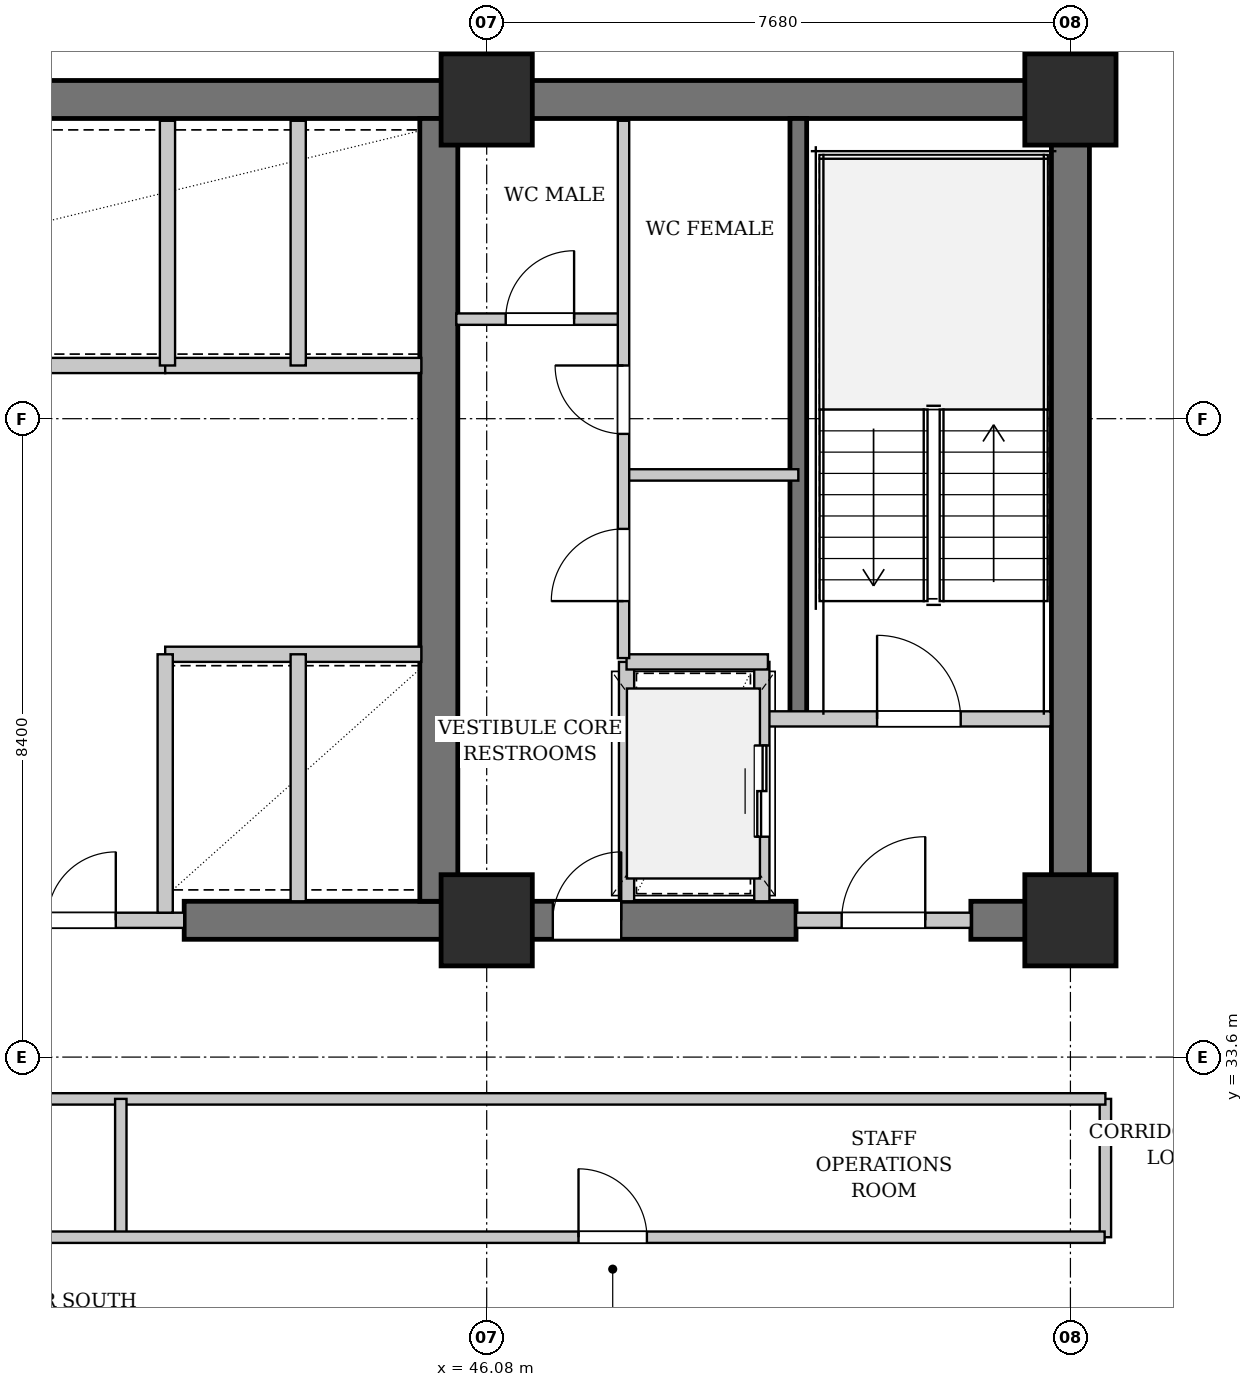
"""IFC4 building model, lengths in metres.
Left out: names, types, materials, properties, quantities, classifications, styles, units other than length and angle.
Written with IfcOpenShell. Run it as: python <this file> out.ifc"""

import sys

from ifc_helpers import new_model, si_unit, direction, frame, frame_2d, origin, origin_2d, place, context, subcontext, project, spatial, rectangle, extrude, element, fill, save


model = new_model("IFC4")
c1 = context("Model", 3, precision=1e-05, world=origin(), true_north=direction((0.0, 1.0)))
c2 = subcontext(c1, "Body", "Model", "MODEL_VIEW")
j1 = project(units=[si_unit("LENGTHUNIT", "METRE"), si_unit("PLANEANGLEUNIT", "RADIAN")], contexts=[c1])
p1 = place(None, origin())
s1 = spatial("IfcSite", under=j1, at=p1, CompositionType="ELEMENT")
p2 = place(p1, origin())
s2 = spatial("IfcBuilding", under=s1, at=p2, CompositionType="ELEMENT")
p3 = place(p2, frame((0.0, 0.0, 64.4)))
s3 = spatial("IfcBuildingStorey", under=s2, at=p3, CompositionType="ELEMENT", Elevation=64.4)
p4 = place(p3, frame((22.79, 46.2, 0.0), z_axis=(0.0, 0.0, 1.0), x_axis=(1.0, 0.0, 0.0)))
e1 = element("IfcWall", 1, at=p4, inside=s3, PredefinedType="SHEAR", context=c2, shape_type="SweptSolid", body=[
    extrude(rectangle(XDim=31.22, YDim=0.5, at=frame_2d((15.61, 0.0))), origin(), (0.0, 0.0, 1.0), 3.18),
])
p5 = place(p3, frame((42.1, 35.4, 0.0), z_axis=(0.0, 0.0, 1.0), x_axis=(1.0, 0.0, 0.0)))
e2 = element("IfcWall", 2, at=p5, inside=s3, PredefinedType="SHEAR", context=c2, shape_type="SweptSolid", body=[
    extrude(rectangle(XDim=8.05, YDim=0.5, at=frame_2d((4.025, 0.0))), origin(), (0.0, 0.0, 1.0), 3.18),
])
p6 = place(p5, frame((4.85, 0.0, 0.0)))
e3 = element("IfcOpeningElement", 3, at=p6, cuts=e2, PredefinedType="OPENING", context=c2, shape_type="SweptSolid", body=[
    extrude(rectangle(XDim=0.9, YDim=2.15, at=frame_2d((0.45, 1.075))), frame((0.0, 0.26, 0.0), z_axis=(0.0, -1.0, 0.0), x_axis=(1.0, 0.0, 0.0)), (0.0, 0.0, 1.0), 0.52),
])
p7 = place(p3, frame((52.45, 35.4, 0.0), z_axis=(0.0, 0.0, 1.0), x_axis=(1.0, 0.0, 0.0)))
e4 = element("IfcWall", 4, at=p7, inside=s3, PredefinedType="SHEAR", context=c2, shape_type="SweptSolid", body=[
    extrude(rectangle(XDim=1.56, YDim=0.5, at=frame_2d((0.78, 0.0))), origin(), (0.0, 0.0, 1.0), 3.18),
])
for number, where, z_axis, x_axis in (
    (5, (45.45, 35.65, 0.0), (0.0, 0.0, 1.0), (0.0, 1.0, 0.0)),
    (6, (53.76, 35.65, 0.0), (0.0, 0.0, 1.0), (0.0, 1.0, 0.0)),
):
    element("IfcWall", number, at=place(p3, frame(where, z_axis=z_axis, x_axis=x_axis)), inside=s3, PredefinedType="SHEAR", context=c2, shape_type="SweptSolid", body=[
        extrude(rectangle(XDim=10.3, YDim=0.5, at=frame_2d((5.15, 0.0))), origin(), (0.0, 0.0, 1.0), 3.18),
    ])
p8 = place(p3, frame((50.18, 38.05, 0.0), z_axis=(0.0, 0.0, 1.0), x_axis=(0.0, 1.0, 0.0)))
e7 = element("IfcWall", 7, at=p8, inside=s3, PredefinedType="SHEAR", context=c2, shape_type="SweptSolid", body=[
    extrude(rectangle(XDim=7.9, YDim=0.22, at=frame_2d((3.95, 0.0))), origin(), (0.0, 0.0, 1.0), 3.18),
])
for number, where, z_axis, x_axis in (
    (8, (46.08, 35.4, 0.0), (0.0, 0.0, 1.0), (1.0, 0.0, 0.0)),
    (9, (46.08, 46.2, 0.0), (0.0, 0.0, 1.0), (1.0, 0.0, 0.0)),
    (10, (53.76, 35.4, 0.0), (0.0, 0.0, 1.0), (1.0, 0.0, 0.0)),
    (11, (53.76, 46.2, 0.0), (0.0, 0.0, 1.0), (1.0, 0.0, 0.0)),
):
    element("IfcColumn", number, at=place(p3, frame(where, z_axis=z_axis, x_axis=x_axis)), inside=s3, PredefinedType="COLUMN", context=c2, shape_type="SweptSolid", body=[
        extrude(rectangle(XDim=1.2, YDim=1.2, at=origin_2d()), origin(), (0.0, 0.0, 1.0), 3.4),
    ])
p9 = place(p3, frame((35.6, 35.4, 0.0), z_axis=(0.0, 0.0, 1.0), x_axis=(1.0, 0.0, 0.0)))
e12 = element("IfcWall", 12, at=p9, inside=s3, PredefinedType="PARTITIONING", context=c2, shape_type="SweptSolid", body=[
    extrude(rectangle(XDim=6.5, YDim=0.2, at=frame_2d((3.25, 0.0))), origin(), (0.0, 0.0, 1.0), 2.475),
])
p10 = place(p9, frame((3.8, 0.0, 0.0)))
e13 = element("IfcOpeningElement", 13, at=p10, cuts=e12, PredefinedType="OPENING", context=c2, shape_type="SweptSolid", body=[
    extrude(rectangle(XDim=1.8, YDim=2.3, at=frame_2d((0.9, 1.15))), frame((0.0, 0.11, 0.0), z_axis=(0.0, -1.0, 0.0), x_axis=(1.0, 0.0, 0.0)), (0.0, 0.0, 1.0), 0.22),
])
p11 = place(p3, frame((36.6, 42.7, 0.0), z_axis=(0.0, 0.0, 1.0), x_axis=(1.0, 0.0, 0.0)))
e14 = element("IfcWall", 14, at=p11, inside=s3, PredefinedType="PARTITIONING", context=c2, shape_type="SweptSolid", body=[
    extrude(rectangle(XDim=5.25, YDim=0.2, at=frame_2d((2.625, 0.0))), origin(), (0.0, 0.0, 1.0), 3.18),
])
for number, where, z_axis, x_axis in (
    (15, (41.85, 38.9, 0.0), (0.0, 0.0, 1.0), (1.0, 0.0, 0.0)),
    (16, (41.85, 42.7, 0.0), (0.0, 0.0, 1.0), (1.0, 0.0, 0.0)),
):
    element("IfcWall", number, at=place(p3, frame(where, z_axis=z_axis, x_axis=x_axis)), inside=s3, PredefinedType="PARTITIONING", context=c2, shape_type="SweptSolid", body=[
        extrude(rectangle(XDim=3.37, YDim=0.2, at=frame_2d((1.685, 0.0))), origin(), (0.0, 0.0, 1.0), 3.18),
    ])
p12 = place(p3, frame((43.6, 35.65, 0.0), z_axis=(0.0, 0.0, 1.0), x_axis=(0.0, 1.0, 0.0)))
e17 = element("IfcWall", 17, at=p12, inside=s3, PredefinedType="PARTITIONING", context=c2, shape_type="SweptSolid", body=[
    extrude(rectangle(XDim=3.25, YDim=0.2, at=frame_2d((1.625, 0.0))), origin(), (0.0, 0.0, 1.0), 3.18),
])
p13 = place(p3, frame((43.6, 42.7, 0.0), z_axis=(0.0, 0.0, 1.0), x_axis=(0.0, 1.0, 0.0)))
e18 = element("IfcWall", 18, at=p13, inside=s3, PredefinedType="PARTITIONING", context=c2, shape_type="SweptSolid", body=[
    extrude(rectangle(XDim=3.22, YDim=0.2, at=frame_2d((1.61, 0.0))), origin(), (0.0, 0.0, 1.0), 3.18),
])
p14 = place(p3, frame((41.85, 35.5, 0.0), z_axis=(0.0, 0.0, 1.0), x_axis=(0.0, 1.0, 0.0)))
e19 = element("IfcWall", 19, at=p14, inside=s3, PredefinedType="PARTITIONING", context=c2, shape_type="SweptSolid", body=[
    extrude(rectangle(XDim=3.4, YDim=0.2, at=frame_2d((1.7, 0.0))), origin(), (0.0, 0.0, 1.0), 3.18),
])
p15 = place(p3, frame((41.88, 42.7, 0.0), z_axis=(0.0, 0.0, 1.0), x_axis=(0.0, 1.0, 0.0)))
e20 = element("IfcWall", 20, at=p15, inside=s3, PredefinedType="PARTITIONING", context=c2, shape_type="SweptSolid", body=[
    extrude(rectangle(XDim=3.22, YDim=0.2, at=frame_2d((1.61, 0.0))), origin(), (0.0, 0.0, 1.0), 3.18),
])
p16 = place(p3, frame((49.78, 38.05, 0.0), z_axis=(0.0, 0.0, 1.0), x_axis=(1.0, 0.0, 0.0)))
e21 = element("IfcWall", 21, at=p16, inside=s3, PredefinedType="PARTITIONING", context=c2, shape_type="SweptSolid", body=[
    extrude(rectangle(XDim=3.72, YDim=0.2, at=frame_2d((1.86, 0.0))), origin(), (0.0, 0.0, 1.0), 3.18),
])
p17 = place(p16, frame((1.436, 0.0, 0.0)))
e22 = element("IfcOpeningElement", 22, at=p17, cuts=e21, PredefinedType="OPENING", context=c2, shape_type="SweptSolid", body=[
    extrude(rectangle(XDim=1.1, YDim=2.15, at=frame_2d((0.55, 1.075))), frame((0.0, 0.11, 0.0), z_axis=(0.0, -1.0, 0.0), x_axis=(1.0, 0.0, 0.0)), (0.0, 0.0, 1.0), 0.22),
])
p18 = place(p3, frame((50.15, 35.4, 0.0), z_axis=(0.0, 0.0, 1.0), x_axis=(1.0, 0.0, 0.0)))
e23 = element("IfcWall", 23, at=p18, inside=s3, PredefinedType="PARTITIONING", context=c2, shape_type="SweptSolid", body=[
    extrude(rectangle(XDim=2.3, YDim=0.2, at=frame_2d((1.15, 0.0))), origin(), (0.0, 0.0, 1.0), 2.475),
])
p19 = place(p18, frame((0.6, 0.0, 0.0)))
e24 = element("IfcOpeningElement", 24, at=p19, cuts=e23, PredefinedType="OPENING", context=c2, shape_type="SweptSolid", body=[
    extrude(rectangle(XDim=1.1, YDim=2.15, at=frame_2d((0.55, 1.075))), frame((0.0, 0.11, 0.0), z_axis=(0.0, -1.0, 0.0), x_axis=(1.0, 0.0, 0.0)), (0.0, 0.0, 1.0), 0.22),
])
p20 = place(p3, frame((49.7, 35.65, 0.0), z_axis=(0.0, 0.0, 1.0), x_axis=(0.0, 1.0, 0.0)))
e25 = element("IfcWall", 25, at=p20, inside=s3, PredefinedType="PARTITIONING", context=c2, shape_type="SweptSolid", body=[
    extrude(rectangle(XDim=3.15, YDim=0.2, at=frame_2d((1.575, 0.0))), origin(), (0.0, 0.0, 1.0), 3.18),
])
p21 = place(p20, frame((0.85, 0.0, 0.0)))
e26 = element("IfcOpeningElement", 26, at=p21, cuts=e25, PredefinedType="OPENING", context=c2, shape_type="SweptSolid", body=[
    extrude(rectangle(XDim=1.2, YDim=2.2, at=frame_2d((0.6, 1.1))), frame((0.0, 0.11, 0.0), z_axis=(0.0, -1.0, 0.0), x_axis=(1.0, 0.0, 0.0)), (0.0, 0.0, 1.0), 0.22),
])
p22 = place(p3, frame((47.92, 35.65, 0.0), z_axis=(0.0, 0.0, 1.0), x_axis=(0.0, 1.0, 0.0)))
e27 = element("IfcWall", 27, at=p22, inside=s3, PredefinedType="PARTITIONING", context=c2, shape_type="SweptSolid", body=[
    extrude(rectangle(XDim=3.15, YDim=0.2, at=frame_2d((1.575, 0.0))), origin(), (0.0, 0.0, 1.0), 3.18),
])
p23 = place(p3, frame((47.92, 38.8, 0.0), z_axis=(0.0, 0.0, 1.0), x_axis=(1.0, 0.0, 0.0)))
e28 = element("IfcWall", 28, at=p23, inside=s3, PredefinedType="PARTITIONING", context=c2, shape_type="SweptSolid", body=[
    extrude(rectangle(XDim=1.86, YDim=0.2, at=frame_2d((0.93, 0.0))), origin(), (0.0, 0.0, 1.0), 3.18),
])
p24 = place(p3, frame((45.68, 43.31, 0.0), z_axis=(0.0, 0.0, 1.0), x_axis=(1.0, 0.0, 0.0)))
e29 = element("IfcWall", 29, at=p24, inside=s3, PredefinedType="PARTITIONING", context=c2, shape_type="SweptSolid", body=[
    extrude(rectangle(XDim=2.2, YDim=0.15, at=frame_2d((1.1, 0.0))), origin(), (0.0, 0.0, 1.0), 3.18),
])
p25 = place(p24, frame((0.65, 0.0, 0.0)))
e30 = element("IfcOpeningElement", 30, at=p25, cuts=e29, PredefinedType="OPENING", context=c2, shape_type="SweptSolid", body=[
    extrude(rectangle(XDim=0.9, YDim=2.15, at=frame_2d((0.45, 1.075))), frame((0.0, 0.085, 0.0), z_axis=(0.0, -1.0, 0.0), x_axis=(1.0, 0.0, 0.0)), (0.0, 0.0, 1.0), 0.17),
])
p26 = place(p3, frame((47.88, 41.26, 0.0), z_axis=(0.0, 0.0, 1.0), x_axis=(1.0, 0.0, 0.0)))
e31 = element("IfcWall", 31, at=p26, inside=s3, PredefinedType="PARTITIONING", context=c2, shape_type="SweptSolid", body=[
    extrude(rectangle(XDim=2.3, YDim=0.15, at=frame_2d((1.15, 0.0))), origin(), (0.0, 0.0, 1.0), 3.18),
])
p27 = place(p3, frame((47.88, 38.85, 0.0), z_axis=(0.0, 0.0, 1.0), x_axis=(0.0, 1.0, 0.0)))
e32 = element("IfcWall", 32, at=p27, inside=s3, PredefinedType="PARTITIONING", context=c2, shape_type="SweptSolid", body=[
    extrude(rectangle(XDim=7.07, YDim=0.15, at=frame_2d((3.535, 0.0))), origin(), (0.0, 0.0, 1.0), 3.18),
])
p28 = place(p27, frame((0.75, 0.0, 0.0)))
e33 = element("IfcOpeningElement", 33, at=p28, cuts=e32, PredefinedType="OPENING", context=c2, shape_type="SweptSolid", body=[
    extrude(rectangle(XDim=0.95, YDim=2.15, at=frame_2d((0.475, 1.075))), frame((0.0, 0.085, 0.0), z_axis=(0.0, -1.0, 0.0), x_axis=(1.0, 0.0, 0.0)), (0.0, 0.0, 1.0), 0.17),
])
p29 = place(p27, frame((2.95, 0.0, 0.0)))
e34 = element("IfcOpeningElement", 34, at=p29, cuts=e32, PredefinedType="OPENING", context=c2, shape_type="SweptSolid", body=[
    extrude(rectangle(XDim=0.9, YDim=2.15, at=frame_2d((0.45, 1.075))), frame((0.0, 0.085, 0.0), z_axis=(0.0, -1.0, 0.0), x_axis=(1.0, 0.0, 0.0)), (0.0, 0.0, 1.0), 0.17),
])
p30 = place(p3, frame((54.22, 31.23, 0.0), z_axis=(0.0, 0.0, 1.0), x_axis=(0.0, 1.0, 0.0)))
e35 = element("IfcWall", 35, at=p30, inside=s3, PredefinedType="PARTITIONING", context=c2, shape_type="SweptSolid", body=[
    extrude(rectangle(XDim=1.82, YDim=0.15, at=frame_2d((0.91, 0.0))), origin(), (0.0, 0.0, 1.0), 3.18),
])
p31 = place(p3, frame((22.63, 33.05, 0.0), z_axis=(0.0, 0.0, 1.0), x_axis=(1.0, 0.0, 0.0)))
e36 = element("IfcWall", 36, at=p31, inside=s3, PredefinedType="PARTITIONING", context=c2, shape_type="SweptSolid", body=[
    extrude(rectangle(XDim=31.59, YDim=0.15, at=frame_2d((15.795, 0.0))), origin(), (0.0, 0.0, 1.0), 3.18),
])
p32 = place(p3, frame((41.266, 31.23, 0.0), z_axis=(0.0, 0.0, 1.0), x_axis=(0.0, 1.0, 0.0)))
e37 = element("IfcWall", 37, at=p32, inside=s3, PredefinedType="PARTITIONING", context=c2, shape_type="SweptSolid", body=[
    extrude(rectangle(XDim=1.82, YDim=0.15, at=frame_2d((0.91, 0.0))), origin(), (0.0, 0.0, 1.0), 3.18),
])
p33 = place(p3, frame((22.64, 31.23, 0.0), z_axis=(0.0, 0.0, 1.0), x_axis=(1.0, 0.0, 0.0)))
e38 = element("IfcWall", 38, at=p33, inside=s3, PredefinedType="PARTITIONING", context=c2, shape_type="SweptSolid", body=[
    extrude(rectangle(XDim=31.57, YDim=0.15, at=frame_2d((15.785, 0.0))), origin(), (0.0, 0.0, 1.0), 3.18),
])
p34 = place(p33, frame((3.18, 0.0, 0.0)))
e39 = element("IfcOpeningElement", 39, at=p34, cuts=e38, PredefinedType="OPENING", context=c2, shape_type="SweptSolid", body=[
    extrude(rectangle(XDim=0.9, YDim=2.15, at=frame_2d((0.45, 1.075))), frame((0.0, 0.085, 0.0), z_axis=(0.0, -1.0, 0.0), x_axis=(1.0, 0.0, 0.0)), (0.0, 0.0, 1.0), 0.17),
])
p35 = place(p33, frame((12.493, 0.0, 0.0)))
e40 = element("IfcOpeningElement", 40, at=p35, cuts=e38, PredefinedType="OPENING", context=c2, shape_type="SweptSolid", body=[
    extrude(rectangle(XDim=0.9, YDim=2.15, at=frame_2d((0.45, 1.075))), frame((0.0, 0.085, 0.0), z_axis=(0.0, -1.0, 0.0), x_axis=(1.0, 0.0, 0.0)), (0.0, 0.0, 1.0), 0.17),
])
p36 = place(p33, frame((24.648, 0.0, 0.0)))
e41 = element("IfcOpeningElement", 41, at=p36, cuts=e38, PredefinedType="OPENING", context=c2, shape_type="SweptSolid", body=[
    extrude(rectangle(XDim=0.9, YDim=2.15, at=frame_2d((0.45, 1.075))), frame((0.0, 0.085, 0.0), z_axis=(0.0, -1.0, 0.0), x_axis=(1.0, 0.0, 0.0)), (0.0, 0.0, 1.0), 0.17),
])
p37 = place(p10, origin())
e42 = element("IfcDoor", 42, at=p37, inside=s3, OperationType="DOUBLE_DOOR_SINGLE_SWING", PredefinedType="DOOR", context=c2, shape_type="SweptSolid", body=[
    extrude(rectangle(XDim=1.8, YDim=2.3, at=frame_2d((0.9, 1.15))), frame((0.0, 0.025, 0.0), z_axis=(0.0, -1.0, 0.0), x_axis=(1.0, 0.0, 0.0)), (0.0, 0.0, 1.0), 0.05),
])
fill(e13, e42)
p38 = place(p17, origin())
e43 = element("IfcDoor", 43, at=p38, inside=s3, OperationType="SINGLE_SWING_LEFT", PredefinedType="DOOR", context=c2, shape_type="SweptSolid", body=[
    extrude(rectangle(XDim=1.1, YDim=2.15, at=frame_2d((0.55, 1.075))), frame((0.0, 0.025, 0.0), z_axis=(0.0, -1.0, 0.0), x_axis=(1.0, 0.0, 0.0)), (0.0, 0.0, 1.0), 0.05),
])
fill(e22, e43)
p39 = place(p19, origin())
e44 = element("IfcDoor", 44, at=p39, inside=s3, OperationType="SINGLE_SWING_RIGHT", PredefinedType="DOOR", context=c2, shape_type="SweptSolid", body=[
    extrude(rectangle(XDim=1.1, YDim=2.15, at=frame_2d((0.55, 1.075))), frame((0.0, 0.025, 0.0), z_axis=(0.0, -1.0, 0.0), x_axis=(1.0, 0.0, 0.0)), (0.0, 0.0, 1.0), 0.05),
])
fill(e24, e44)
p40 = place(p21, origin())
e45 = element("IfcDoor", 45, at=p40, inside=s3, OperationType="DOUBLE_DOOR_SLIDING", PredefinedType="DOOR", context=c2, shape_type="SweptSolid", body=[
    extrude(rectangle(XDim=1.2, YDim=2.2, at=frame_2d((0.6, 1.1))), frame((0.0, 0.025, 0.0), z_axis=(0.0, -1.0, 0.0), x_axis=(1.0, 0.0, 0.0)), (0.0, 0.0, 1.0), 0.05),
])
fill(e26, e45)
p41 = place(p25, origin())
e46 = element("IfcDoor", 46, at=p41, inside=s3, OperationType="SINGLE_SWING_RIGHT", PredefinedType="DOOR", context=c2, shape_type="SweptSolid", body=[
    extrude(rectangle(XDim=0.9, YDim=2.15, at=frame_2d((0.45, 1.075))), frame((0.0, 0.025, 0.0), z_axis=(0.0, -1.0, 0.0), x_axis=(1.0, 0.0, 0.0)), (0.0, 0.0, 1.0), 0.05),
])
fill(e30, e46)
p42 = place(p28, origin())
e47 = element("IfcDoor", 47, at=p42, inside=s3, OperationType="SINGLE_SWING_LEFT", PredefinedType="DOOR", context=c2, shape_type="SweptSolid", body=[
    extrude(rectangle(XDim=0.95, YDim=2.15, at=frame_2d((0.475, 1.075))), frame((0.0, 0.025, 0.0), z_axis=(0.0, -1.0, 0.0), x_axis=(1.0, 0.0, 0.0)), (0.0, 0.0, 1.0), 0.05),
])
fill(e33, e47)
p43 = place(p29, origin())
e48 = element("IfcDoor", 48, at=p43, inside=s3, OperationType="SINGLE_SWING_RIGHT", PredefinedType="DOOR", context=c2, shape_type="SweptSolid", body=[
    extrude(rectangle(XDim=0.9, YDim=2.15, at=frame_2d((0.45, 1.075))), frame((0.0, 0.025, 0.0), z_axis=(0.0, -1.0, 0.0), x_axis=(1.0, 0.0, 0.0)), (0.0, 0.0, 1.0), 0.05),
])
fill(e34, e48)
p44 = place(p36, origin())
e49 = element("IfcDoor", 49, at=p44, inside=s3, OperationType="SINGLE_SWING_LEFT", PredefinedType="DOOR", context=c2, shape_type="SweptSolid", body=[
    extrude(rectangle(XDim=0.9, YDim=2.15, at=frame_2d((0.45, 1.075))), frame((0.0, 0.025, 0.0), z_axis=(0.0, -1.0, 0.0), x_axis=(1.0, 0.0, 0.0)), (0.0, 0.0, 1.0), 0.05),
])
fill(e41, e49)
p45 = place(p6, origin())
e50 = element("IfcDoor", 50, at=p45, inside=s3, OperationType="SINGLE_SWING_RIGHT", PredefinedType="DOOR", context=c2, shape_type="SweptSolid", body=[
    extrude(rectangle(XDim=0.9, YDim=2.15, at=frame_2d((0.45, 1.075))), frame((0.0, 0.025, 0.0), z_axis=(0.0, -1.0, 0.0), x_axis=(1.0, 0.0, 0.0)), (0.0, 0.0, 1.0), 0.05),
])
fill(e3, e50)
save(model, sys.argv[1])
